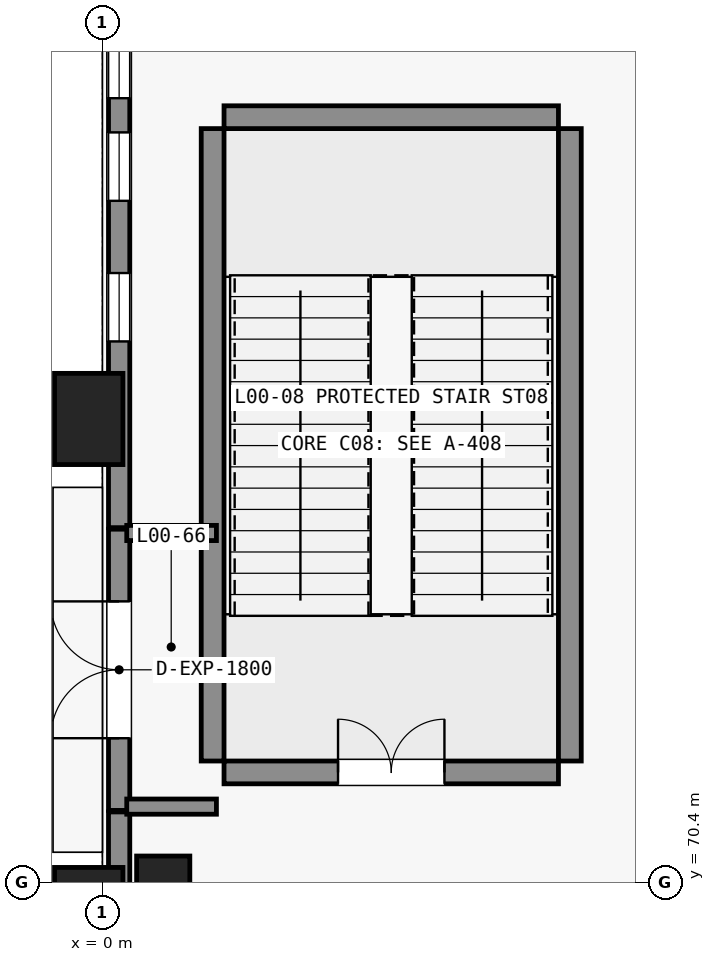
"""IFC4 building model, lengths in metres.
Left out: names, types, materials, properties, quantities, classifications, styles, units other than length and angle.
Written with IfcOpenShell. Run it as: python <this file> out.ifc"""

import sys

from ifc_helpers import new_model, si_unit, direction, frame, frame_2d, origin, origin_2d, place, context, subcontext, project, spatial, rectangle, extrude, element, fill, save


model = new_model("IFC4")
c1 = context("Model", 3, precision=1e-05, world=origin(), true_north=direction((0.0, 1.0)))
c2 = subcontext(c1, "Body", "Model", "MODEL_VIEW")
j1 = project(units=[si_unit("LENGTHUNIT", "METRE"), si_unit("PLANEANGLEUNIT", "RADIAN")], contexts=[c1])
p1 = place(None, origin())
s1 = spatial("IfcSite", under=j1, at=p1, CompositionType="ELEMENT")
p2 = place(p1, origin())
s2 = spatial("IfcBuilding", under=s1, at=p2, CompositionType="ELEMENT")
p3 = place(p2, origin())
s3 = spatial("IfcBuildingStorey", under=s2, at=p3, CompositionType="ELEMENT", Elevation=0.0)
for number, where, z_axis, x_axis in (
    (1, (-0.18, 70.0, -0.45), (0.0, 0.0, 1.0), (1.0, 0.0, 0.0)),
    (2, (-0.18, 76.5, -0.45), (0.0, 0.0, 1.0), (1.0, 0.0, 0.0)),
):
    element("IfcColumn", number, at=place(p3, frame(where, z_axis=z_axis, x_axis=x_axis)), inside=s3, PredefinedType="PILASTER", context=c2, shape_type="SweptSolid", body=[
        extrude(rectangle(XDim=0.9, YDim=1.2, at=origin_2d()), origin(), (0.0, 0.0, 1.0), 6.45),
    ])
p4 = place(p3, frame((0.8, 70.4, -0.45), z_axis=(0.0, 0.0, 1.0), x_axis=(1.0, 0.0, 0.0)))
e3 = element("IfcColumn", 3, at=p4, inside=s3, PredefinedType="COLUMN", context=c2, shape_type="SweptSolid", body=[
    extrude(rectangle(XDim=0.7, YDim=0.7, at=origin_2d()), origin(), (0.0, 0.0, 1.0), 6.45),
])
p5 = place(p3, frame((1.6, 71.85, 0.0), z_axis=(0.0, 0.0, 1.0), x_axis=(1.0, 0.0, 0.0)))
e4 = element("IfcWall", 4, at=p5, inside=s3, PredefinedType="SHEAR", context=c2, shape_type="SweptSolid", body=[
    extrude(rectangle(XDim=4.4, YDim=0.3, at=frame_2d((2.2, 0.0))), origin(), (0.0, 0.0, 1.0), 6.0),
])
p6 = place(p5, frame((1.5, 0.0, 0.0)))
e5 = element("IfcOpeningElement", 5, at=p6, cuts=e4, PredefinedType="OPENING", context=c2, shape_type="SweptSolid", body=[
    extrude(rectangle(XDim=1.4, YDim=2.2, at=frame_2d((0.7, 1.1))), frame((0.0, 0.16, 0.0), z_axis=(0.0, -1.0, 0.0), x_axis=(1.0, 0.0, 0.0)), (0.0, 0.0, 1.0), 0.32),
])
p7 = place(p3, frame((1.6, 80.47, 0.0), z_axis=(0.0, 0.0, 1.0), x_axis=(1.0, 0.0, 0.0)))
e6 = element("IfcWall", 6, at=p7, inside=s3, PredefinedType="SHEAR", context=c2, shape_type="SweptSolid", body=[
    extrude(rectangle(XDim=4.4, YDim=0.3, at=frame_2d((2.2, 0.0))), origin(), (0.0, 0.0, 1.0), 6.0),
])
for number, where, z_axis, x_axis in (
    (7, (1.45, 72.0, 0.0), (0.0, 0.0, 1.0), (0.0, 1.0, 0.0)),
    (8, (6.15, 72.0, 0.0), (0.0, 0.0, 1.0), (0.0, 1.0, 0.0)),
):
    element("IfcWall", number, at=place(p3, frame(where, z_axis=z_axis, x_axis=x_axis)), inside=s3, PredefinedType="SHEAR", context=c2, shape_type="SweptSolid", body=[
        extrude(rectangle(XDim=8.32, YDim=0.3, at=frame_2d((4.16, 0.0))), origin(), (0.0, 0.0, 1.0), 6.0),
    ])
p8 = place(p3, frame((0.22, 70.2, 0.0), z_axis=(0.0, 0.0, 1.0), x_axis=(0.0, 1.0, 0.0)))
e9 = element("IfcWall", 9, at=p8, inside=s3, PredefinedType="STANDARD", context=c2, shape_type="SweptSolid", body=[
    extrude(rectangle(XDim=1.13, YDim=0.28, at=frame_2d((0.565, 0.0))), origin(), (0.0, 0.0, 1.0), 5.64),
])
p9 = place(p3, frame((0.22, 75.07, 0.0), z_axis=(0.0, 0.0, 1.0), x_axis=(0.0, 1.0, 0.0)))
e10 = element("IfcWall", 10, at=p9, inside=s3, PredefinedType="STANDARD", context=c2, shape_type="SweptSolid", body=[
    extrude(rectangle(XDim=20.31, YDim=0.28, at=frame_2d((10.155, 0.0))), origin(), (0.0, 0.0, 1.0), 5.64),
])
p10 = place(p9, frame((2.45, 0.0, 0.95)))
e11 = element("IfcOpeningElement", 11, at=p10, cuts=e10, PredefinedType="OPENING", context=c2, shape_type="SweptSolid", body=[
    extrude(rectangle(XDim=0.9, YDim=2.85, at=frame_2d((0.45, 1.425))), frame((0.0, 0.15, 0.0), z_axis=(0.0, -1.0, 0.0), x_axis=(1.0, 0.0, 0.0)), (0.0, 0.0, 1.0), 0.3),
])
p11 = place(p9, frame((4.3, 0.0, 0.95)))
e12 = element("IfcOpeningElement", 12, at=p11, cuts=e10, PredefinedType="OPENING", context=c2, shape_type="SweptSolid", body=[
    extrude(rectangle(XDim=0.9, YDim=2.85, at=frame_2d((0.45, 1.425))), frame((0.0, 0.15, 0.0), z_axis=(0.0, -1.0, 0.0), x_axis=(1.0, 0.0, 0.0)), (0.0, 0.0, 1.0), 0.3),
])
p12 = place(p9, frame((5.65, 0.0, 0.95)))
e13 = element("IfcOpeningElement", 13, at=p12, cuts=e10, PredefinedType="OPENING", context=c2, shape_type="SweptSolid", body=[
    extrude(rectangle(XDim=0.9, YDim=2.85, at=frame_2d((0.45, 1.425))), frame((0.0, 0.15, 0.0), z_axis=(0.0, -1.0, 0.0), x_axis=(1.0, 0.0, 0.0)), (0.0, 0.0, 1.0), 0.3),
])
p13 = place(p9, frame((8.85, 0.0, 0.95)))
e14 = element("IfcOpeningElement", 14, at=p13, cuts=e10, PredefinedType="OPENING", context=c2, shape_type="SweptSolid", body=[
    extrude(rectangle(XDim=0.9, YDim=2.85, at=frame_2d((0.45, 1.425))), frame((0.0, 0.15, 0.0), z_axis=(0.0, -1.0, 0.0), x_axis=(1.0, 0.0, 0.0)), (0.0, 0.0, 1.0), 0.3),
])
p14 = place(p9, frame((10.7, 0.0, 0.95)))
e15 = element("IfcOpeningElement", 15, at=p14, cuts=e10, PredefinedType="OPENING", context=c2, shape_type="SweptSolid", body=[
    extrude(rectangle(XDim=0.9, YDim=2.85, at=frame_2d((0.45, 1.425))), frame((0.0, 0.15, 0.0), z_axis=(0.0, -1.0, 0.0), x_axis=(1.0, 0.0, 0.0)), (0.0, 0.0, 1.0), 0.3),
])
p15 = place(p9, frame((12.05, 0.0, 0.95)))
e16 = element("IfcOpeningElement", 16, at=p15, cuts=e10, PredefinedType="OPENING", context=c2, shape_type="SweptSolid", body=[
    extrude(rectangle(XDim=0.9, YDim=2.85, at=frame_2d((0.45, 1.425))), frame((0.0, 0.15, 0.0), z_axis=(0.0, -1.0, 0.0), x_axis=(1.0, 0.0, 0.0)), (0.0, 0.0, 1.0), 0.3),
])
p16 = place(p9, frame((15.25, 0.0, 0.95)))
e17 = element("IfcOpeningElement", 17, at=p16, cuts=e10, PredefinedType="OPENING", context=c2, shape_type="SweptSolid", body=[
    extrude(rectangle(XDim=0.9, YDim=2.85, at=frame_2d((0.45, 1.425))), frame((0.0, 0.15, 0.0), z_axis=(0.0, -1.0, 0.0), x_axis=(1.0, 0.0, 0.0)), (0.0, 0.0, 1.0), 0.3),
])
p17 = place(p3, frame((0.22, 71.35, 0.0), z_axis=(0.0, 0.0, 1.0), x_axis=(0.0, 1.0, 0.0)))
e18 = element("IfcWall", 18, at=p17, inside=s3, PredefinedType="STANDARD", context=c2, shape_type="SweptSolid", body=[
    extrude(rectangle(XDim=3.7, YDim=0.28, at=frame_2d((1.85, 0.0))), origin(), (0.0, 0.0, 1.0), 5.64),
])
p18 = place(p17, frame((0.95, 0.0, 0.0)))
e19 = element("IfcOpeningElement", 19, at=p18, cuts=e18, PredefinedType="OPENING", context=c2, shape_type="SweptSolid", body=[
    extrude(rectangle(XDim=1.8, YDim=2.25, at=frame_2d((0.9, 1.125))), frame((0.0, 0.15, 0.0), z_axis=(0.0, -1.0, 0.0), x_axis=(1.0, 0.0, 0.0)), (0.0, 0.0, 1.0), 0.3),
])
for number, where, z_axis, x_axis in (
    (20, (0.32, 71.4, 0.0), (0.0, 0.0, 1.0), (1.0, 0.0, 0.0)),
    (21, (0.32, 75.0, 0.0), (0.0, 0.0, 1.0), (1.0, 0.0, 0.0)),
):
    element("IfcWall", number, at=place(p3, frame(where, z_axis=z_axis, x_axis=x_axis)), inside=s3, PredefinedType="STANDARD", context=c2, shape_type="SweptSolid", body=[
        extrude(rectangle(XDim=1.18, YDim=0.2, at=frame_2d((0.59, 0.0))), origin(), (0.0, 0.0, 1.0), 4.89),
    ])
p19 = place(p10, origin())
e22 = element("IfcWindow", 22, at=p19, inside=s3, PartitioningType="DOUBLE_PANEL_VERTICAL", PredefinedType="WINDOW", context=c2, shape_type="SweptSolid", body=[
    extrude(rectangle(XDim=0.9, YDim=2.85, at=frame_2d((0.45, 1.425))), frame((0.0, 0.03, 0.0), z_axis=(0.0, -1.0, 0.0), x_axis=(1.0, 0.0, 0.0)), (0.0, 0.0, 1.0), 0.06),
])
fill(e11, e22)
p20 = place(p11, origin())
e23 = element("IfcWindow", 23, at=p20, inside=s3, PartitioningType="DOUBLE_PANEL_VERTICAL", PredefinedType="WINDOW", context=c2, shape_type="SweptSolid", body=[
    extrude(rectangle(XDim=0.9, YDim=2.85, at=frame_2d((0.45, 1.425))), frame((0.0, 0.03, 0.0), z_axis=(0.0, -1.0, 0.0), x_axis=(1.0, 0.0, 0.0)), (0.0, 0.0, 1.0), 0.06),
])
fill(e12, e23)
p21 = place(p12, origin())
e24 = element("IfcWindow", 24, at=p21, inside=s3, PartitioningType="DOUBLE_PANEL_VERTICAL", PredefinedType="WINDOW", context=c2, shape_type="SweptSolid", body=[
    extrude(rectangle(XDim=0.9, YDim=2.85, at=frame_2d((0.45, 1.425))), frame((0.0, 0.03, 0.0), z_axis=(0.0, -1.0, 0.0), x_axis=(1.0, 0.0, 0.0)), (0.0, 0.0, 1.0), 0.06),
])
fill(e13, e24)
p22 = place(p6, origin())
e25 = element("IfcDoor", 25, at=p22, inside=s3, OperationType="DOUBLE_DOOR_SINGLE_SWING", PredefinedType="DOOR", context=c2, shape_type="SweptSolid", body=[
    extrude(rectangle(XDim=1.4, YDim=2.2, at=frame_2d((0.7, 1.1))), frame((0.0, 0.025, 0.0), z_axis=(0.0, -1.0, 0.0), x_axis=(1.0, 0.0, 0.0)), (0.0, 0.0, 1.0), 0.05),
])
fill(e5, e25)
p23 = place(p18, origin())
e26 = element("IfcDoor", 26, at=p23, inside=s3, OperationType="DOUBLE_DOOR_SINGLE_SWING", PredefinedType="DOOR", context=c2, shape_type="SweptSolid", body=[
    extrude(rectangle(XDim=1.8, YDim=2.25, at=frame_2d((0.9, 1.125))), frame((0.0, 0.025, 0.0), z_axis=(0.0, -1.0, 0.0), x_axis=(1.0, 0.0, 0.0)), (0.0, 0.0, 1.0), 0.05),
])
fill(e19, e26)
save(model, sys.argv[1])
